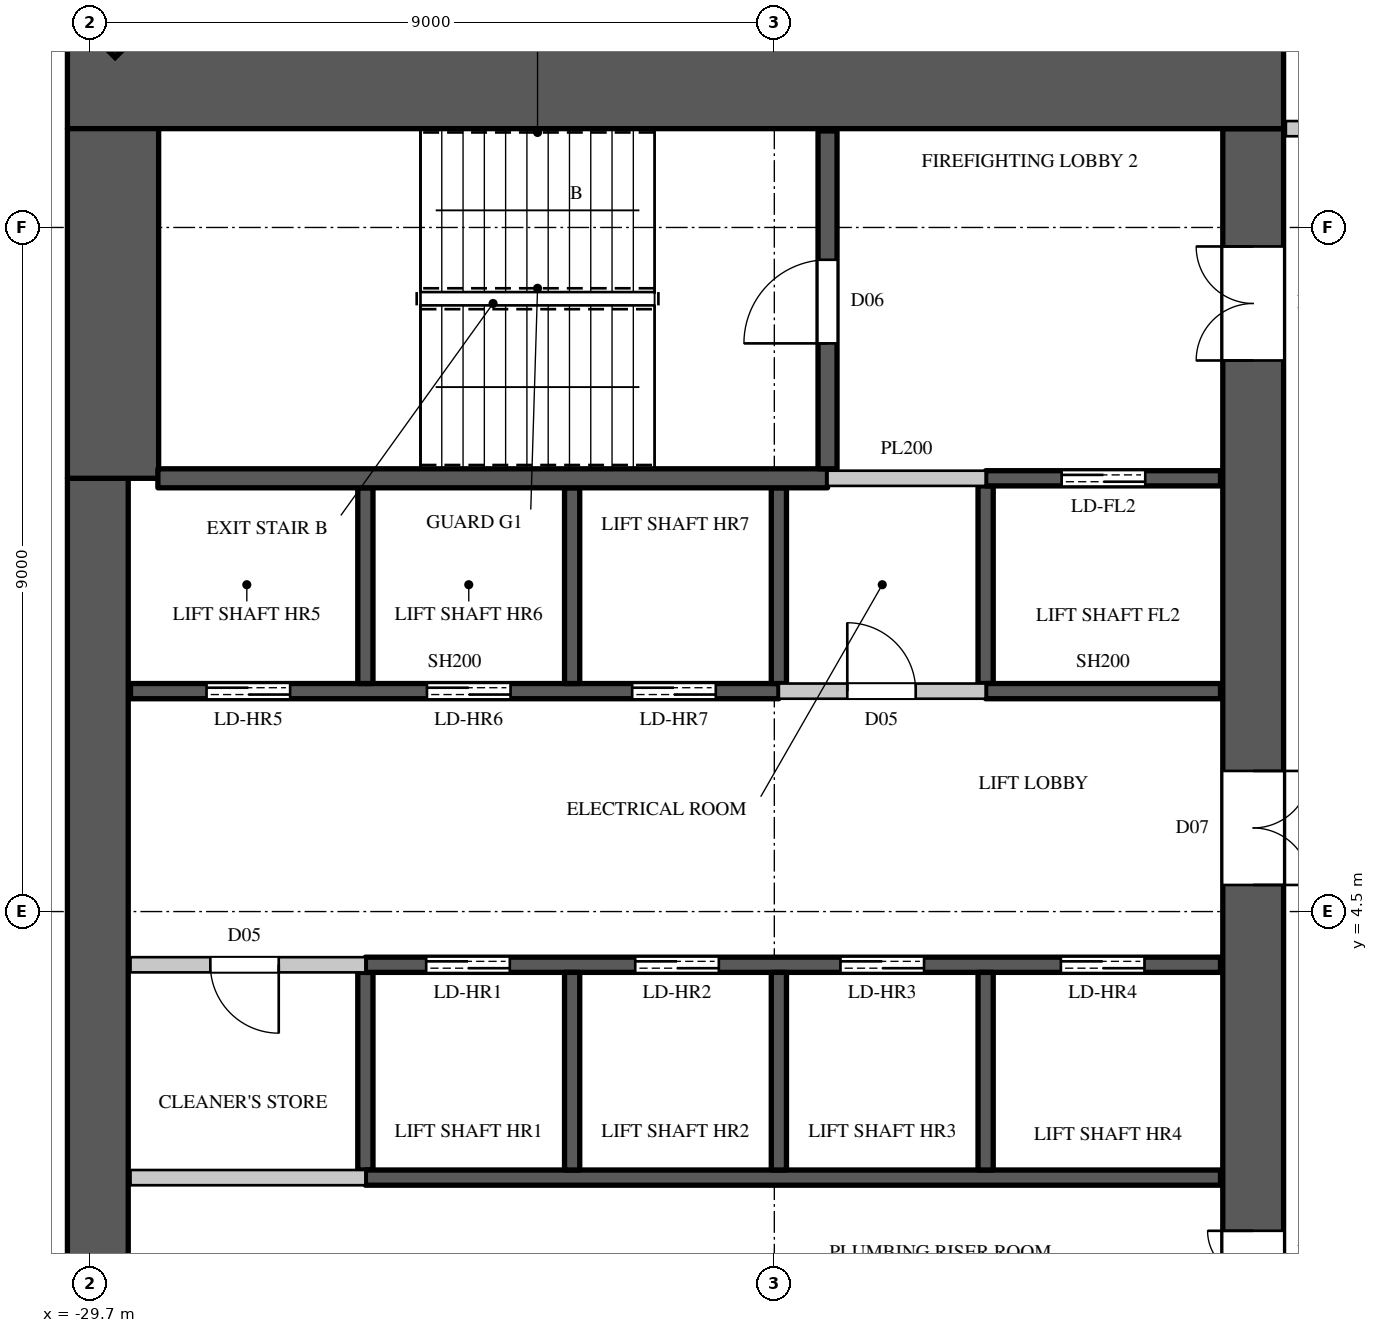
"""IFC4 building model, lengths in metres.
Left out: names, types, materials, properties, quantities, classifications, styles, units other than length and angle.
Written with IfcOpenShell. Run it as: python <this file> out.ifc"""

import sys

from ifc_helpers import new_model, si_unit, direction, frame, frame_2d, origin, origin_2d, place, context, subcontext, project, spatial, rectangle, extrude, element, fill, save


model = new_model("IFC4")
c1 = context("Model", 3, precision=1e-05, world=origin(), true_north=direction((0.0, 1.0)))
c2 = subcontext(c1, "Body", "Model", "MODEL_VIEW")
j1 = project(units=[si_unit("LENGTHUNIT", "METRE"), si_unit("PLANEANGLEUNIT", "RADIAN")], contexts=[c1])
p1 = place(None, origin())
s1 = spatial("IfcSite", under=j1, at=p1, CompositionType="ELEMENT")
p2 = place(p1, origin())
s2 = spatial("IfcBuilding", under=s1, at=p2, CompositionType="ELEMENT")
p3 = place(p2, frame((0.0, 0.0, 222.0)))
s3 = spatial("IfcBuildingStorey", under=s2, at=p3, CompositionType="ELEMENT", Elevation=222.0)
p4 = place(p3, frame((-29.443, 16.443, 0.0), z_axis=(0.0, 0.0, 1.0), x_axis=(-0.707106781187, -0.707106781187, 0.0)))
e1 = element("IfcColumn", 1, at=p4, inside=s3, PredefinedType="COLUMN", context=c2, shape_type="SweptSolid", body=[
    extrude(rectangle(XDim=0.9, YDim=1.1, at=origin_2d()), origin(), (0.0, 0.0, 1.0), 4.1),
])
p5 = place(p3, frame((-30.0, 15.4, 0.0), z_axis=(0.0, 0.0, 1.0), x_axis=(1.0, 0.0, 0.0)))
e2 = element("IfcWall", 2, at=p5, inside=s3, PredefinedType="SHEAR", context=c2, shape_type="SweptSolid", body=[
    extrude(rectangle(XDim=16.0, YDim=1.2, at=frame_2d((8.0, 0.0))), origin(), (0.0, 0.0, 1.0), 4.1),
])
p6 = place(p3, frame((-14.4, -14.8, 0.0), z_axis=(0.0, 0.0, 1.0), x_axis=(0.0, 1.0, 0.0)))
e3 = element("IfcWall", 3, at=p6, inside=s3, PredefinedType="SHEAR", context=c2, shape_type="SweptSolid", body=[
    extrude(rectangle(XDim=29.6, YDim=0.8, at=frame_2d((14.8, 0.0))), origin(), (0.0, 0.0, 1.0), 4.1),
])
p7 = place(p6, frame((1.55, 0.0, 0.0)))
e4 = element("IfcOpeningElement", 4, at=p7, cuts=e3, PredefinedType="OPENING", context=c2, shape_type="SweptSolid", body=[
    extrude(rectangle(XDim=1.5, YDim=2.4, at=frame_2d((0.75, 1.2))), frame((0.0, 0.41, 0.0), z_axis=(0.0, -1.0, 0.0), x_axis=(1.0, 0.0, 0.0)), (0.0, 0.0, 1.0), 0.82),
])
p8 = place(p6, frame((26.55, 0.0, 0.0)))
e5 = element("IfcOpeningElement", 5, at=p8, cuts=e3, PredefinedType="OPENING", context=c2, shape_type="SweptSolid", body=[
    extrude(rectangle(XDim=1.5, YDim=2.4, at=frame_2d((0.75, 1.2))), frame((0.0, 0.41, 0.0), z_axis=(0.0, -1.0, 0.0), x_axis=(1.0, 0.0, 0.0)), (0.0, 0.0, 1.0), 0.82),
])
p9 = place(p6, frame((8.45, 0.0, 0.0)))
e6 = element("IfcOpeningElement", 6, at=p9, cuts=e3, PredefinedType="OPENING", context=c2, shape_type="SweptSolid", body=[
    extrude(rectangle(XDim=1.5, YDim=2.4, at=frame_2d((0.75, 1.2))), frame((0.0, 0.41, 0.0), z_axis=(0.0, -1.0, 0.0), x_axis=(1.0, 0.0, 0.0)), (0.0, 0.0, 1.0), 0.82),
])
p10 = place(p6, frame((19.65, 0.0, 0.0)))
e7 = element("IfcOpeningElement", 7, at=p10, cuts=e3, PredefinedType="OPENING", context=c2, shape_type="SweptSolid", body=[
    extrude(rectangle(XDim=1.5, YDim=2.4, at=frame_2d((0.75, 1.2))), frame((0.0, 0.41, 0.0), z_axis=(0.0, -1.0, 0.0), x_axis=(1.0, 0.0, 0.0)), (0.0, 0.0, 1.0), 0.82),
])
p11 = place(p6, frame((14.5, 0.0, 0.0)))
e8 = element("IfcOpeningElement", 8, at=p11, cuts=e3, PredefinedType="OPENING", context=c2, shape_type="SweptSolid", body=[
    extrude(rectangle(XDim=0.6, YDim=2.0, at=frame_2d((0.3, 1.0))), frame((0.0, 0.41, 0.0), z_axis=(0.0, -1.0, 0.0), x_axis=(1.0, 0.0, 0.0)), (0.0, 0.0, 1.0), 0.82),
])
p12 = place(p3, frame((-29.6, -10.2, 0.0), z_axis=(0.0, 0.0, 1.0), x_axis=(0.0, 1.0, 0.0)))
e9 = element("IfcWall", 9, at=p12, inside=s3, PredefinedType="SHEAR", context=c2, shape_type="SweptSolid", body=[
    extrude(rectangle(XDim=20.4, YDim=0.8, at=frame_2d((10.2, 0.0))), origin(), (0.0, 0.0, 1.0), 4.1),
])
p13 = place(p3, frame((-29.4, 10.2, 0.0), z_axis=(0.0, 0.0, 1.0), x_axis=(0.0, 1.0, 0.0)))
e10 = element("IfcWall", 10, at=p13, inside=s3, PredefinedType="SHEAR", context=c2, shape_type="SweptSolid", body=[
    extrude(rectangle(XDim=4.6, YDim=1.2, at=frame_2d((2.3, 0.0))), origin(), (0.0, 0.0, 1.0), 4.1),
])
p14 = place(p3, frame((-29.17, 3.8, 0.0), z_axis=(0.0, 0.0, 1.0), x_axis=(1.0, 0.0, 0.0)))
e11 = element("IfcWall", 11, at=p14, inside=s3, PredefinedType="PARTITIONING", context=c2, shape_type="SweptSolid", body=[
    extrude(rectangle(XDim=3.09, YDim=0.2, at=frame_2d((1.545, 0.0))), origin(), (0.0, 0.0, 1.0), 3.8),
])
p15 = place(p14, frame((1.05, 0.0, 0.0)))
e12 = element("IfcOpeningElement", 12, at=p15, cuts=e11, PredefinedType="OPENING", context=c2, shape_type="SweptSolid", body=[
    extrude(rectangle(XDim=0.9, YDim=2.2, at=frame_2d((0.45, 1.1))), frame((0.0, 0.11, 0.0), z_axis=(0.0, -1.0, 0.0), x_axis=(1.0, 0.0, 0.0)), (0.0, 0.0, 1.0), 0.22),
])
p16 = place(p3, frame((-13.97, 14.8, 0.0), z_axis=(0.0, 0.0, 1.0), x_axis=(1.0, 0.0, 0.0)))
e13 = element("IfcWall", 13, at=p16, inside=s3, PredefinedType="PARTITIONING", context=c2, shape_type="SweptSolid", body=[
    extrude(rectangle(XDim=2.87, YDim=0.2, at=frame_2d((1.435, 0.0))), origin(), (0.0, 0.0, 1.0), 3.8),
])
p17 = place(p3, frame((-29.17, 1.0, 0.0), z_axis=(0.0, 0.0, 1.0), x_axis=(1.0, 0.0, 0.0)))
e14 = element("IfcWall", 14, at=p17, inside=s3, PredefinedType="PARTITIONING", context=c2, shape_type="SweptSolid", body=[
    extrude(rectangle(XDim=3.09, YDim=0.2, at=frame_2d((1.545, 0.0))), origin(), (0.0, 0.0, 1.0), 3.8),
])
p18 = place(p3, frame((-20.64, 7.4, 0.0), z_axis=(0.0, 0.0, 1.0), x_axis=(1.0, 0.0, 0.0)))
e15 = element("IfcWall", 15, at=p18, inside=s3, PredefinedType="PARTITIONING", context=c2, shape_type="SweptSolid", body=[
    extrude(rectangle(XDim=2.72, YDim=0.2, at=frame_2d((1.36, 0.0))), origin(), (0.0, 0.0, 1.0), 3.8),
])
p19 = place(p18, frame((0.9, 0.0, 0.0)))
e16 = element("IfcOpeningElement", 16, at=p19, cuts=e15, PredefinedType="OPENING", context=c2, shape_type="SweptSolid", body=[
    extrude(rectangle(XDim=0.9, YDim=2.2, at=frame_2d((0.45, 1.1))), frame((0.0, 0.11, 0.0), z_axis=(0.0, -1.0, 0.0), x_axis=(1.0, 0.0, 0.0)), (0.0, 0.0, 1.0), 0.22),
])
p20 = place(p3, frame((-20.0, 10.2, 0.0), z_axis=(0.0, 0.0, 1.0), x_axis=(1.0, 0.0, 0.0)))
e17 = element("IfcWall", 17, at=p20, inside=s3, PredefinedType="PARTITIONING", context=c2, shape_type="SweptSolid", body=[
    extrude(rectangle(XDim=2.08, YDim=0.2, at=frame_2d((1.04, 0.0))), origin(), (0.0, 0.0, 1.0), 3.8),
])
p21 = place(p3, frame((-29.17, 7.4, 0.0), z_axis=(0.0, 0.0, 1.0), x_axis=(1.0, 0.0, 0.0)))
e18 = element("IfcWall", 18, at=p21, inside=s3, PredefinedType="SHEAR", context=c2, shape_type="SweptSolid", body=[
    extrude(rectangle(XDim=8.53, YDim=0.2, at=frame_2d((4.265, 0.0))), origin(), (0.0, 0.0, 1.0), 3.8),
])
p22 = place(p21, frame((1.0, 0.0, 0.0)))
e19 = element("IfcOpeningElement", 19, at=p22, cuts=e18, PredefinedType="OPENING", context=c2, shape_type="SweptSolid", body=[
    extrude(rectangle(XDim=1.1, YDim=2.2, at=frame_2d((0.55, 1.1))), frame((0.0, 0.11, 0.0), z_axis=(0.0, -1.0, 0.0), x_axis=(1.0, 0.0, 0.0)), (0.0, 0.0, 1.0), 0.22),
])
p23 = place(p21, frame((3.9, 0.0, 0.0)))
e20 = element("IfcOpeningElement", 20, at=p23, cuts=e18, PredefinedType="OPENING", context=c2, shape_type="SweptSolid", body=[
    extrude(rectangle(XDim=1.1, YDim=2.2, at=frame_2d((0.55, 1.1))), frame((0.0, 0.11, 0.0), z_axis=(0.0, -1.0, 0.0), x_axis=(1.0, 0.0, 0.0)), (0.0, 0.0, 1.0), 0.22),
])
p24 = place(p21, frame((6.6, 0.0, 0.0)))
e21 = element("IfcOpeningElement", 21, at=p24, cuts=e18, PredefinedType="OPENING", context=c2, shape_type="SweptSolid", body=[
    extrude(rectangle(XDim=1.1, YDim=2.2, at=frame_2d((0.55, 1.1))), frame((0.0, 0.11, 0.0), z_axis=(0.0, -1.0, 0.0), x_axis=(1.0, 0.0, 0.0)), (0.0, 0.0, 1.0), 0.22),
])
p25 = place(p3, frame((-26.08, 1.1, 0.0), z_axis=(0.0, 0.0, 1.0), x_axis=(0.0, 1.0, 0.0)))
e22 = element("IfcWall", 22, at=p25, inside=s3, PredefinedType="SHEAR", context=c2, shape_type="SweptSolid", body=[
    extrude(rectangle(XDim=2.6, YDim=0.2, at=frame_2d((1.3, 0.0))), origin(), (0.0, 0.0, 1.0), 3.8),
])
p26 = place(p3, frame((-26.08, 1.0, 0.0), z_axis=(0.0, 0.0, 1.0), x_axis=(1.0, 0.0, 0.0)))
e23 = element("IfcWall", 23, at=p26, inside=s3, PredefinedType="SHEAR", context=c2, shape_type="SweptSolid", body=[
    extrude(rectangle(XDim=11.25, YDim=0.2, at=frame_2d((5.625, 0.0))), origin(), (0.0, 0.0, 1.0), 3.8),
])
p27 = place(p3, frame((-26.08, 3.8, 0.0), z_axis=(0.0, 0.0, 1.0), x_axis=(1.0, 0.0, 0.0)))
e24 = element("IfcWall", 24, at=p27, inside=s3, PredefinedType="SHEAR", context=c2, shape_type="SweptSolid", body=[
    extrude(rectangle(XDim=11.25, YDim=0.2, at=frame_2d((5.625, 0.0))), origin(), (0.0, 0.0, 1.0), 3.8),
])
p28 = place(p27, frame((0.8, 0.0, 0.0)))
e25 = element("IfcOpeningElement", 25, at=p28, cuts=e24, PredefinedType="OPENING", context=c2, shape_type="SweptSolid", body=[
    extrude(rectangle(XDim=1.1, YDim=2.2, at=frame_2d((0.55, 1.1))), frame((0.0, 0.11, 0.0), z_axis=(0.0, -1.0, 0.0), x_axis=(1.0, 0.0, 0.0)), (0.0, 0.0, 1.0), 0.22),
])
p29 = place(p27, frame((3.55, 0.0, 0.0)))
e26 = element("IfcOpeningElement", 26, at=p29, cuts=e24, PredefinedType="OPENING", context=c2, shape_type="SweptSolid", body=[
    extrude(rectangle(XDim=1.1, YDim=2.2, at=frame_2d((0.55, 1.1))), frame((0.0, 0.11, 0.0), z_axis=(0.0, -1.0, 0.0), x_axis=(1.0, 0.0, 0.0)), (0.0, 0.0, 1.0), 0.22),
])
p30 = place(p27, frame((6.25, 0.0, 0.0)))
e27 = element("IfcOpeningElement", 27, at=p30, cuts=e24, PredefinedType="OPENING", context=c2, shape_type="SweptSolid", body=[
    extrude(rectangle(XDim=1.1, YDim=2.2, at=frame_2d((0.55, 1.1))), frame((0.0, 0.11, 0.0), z_axis=(0.0, -1.0, 0.0), x_axis=(1.0, 0.0, 0.0)), (0.0, 0.0, 1.0), 0.22),
])
p31 = place(p27, frame((9.15, 0.0, 0.0)))
e28 = element("IfcOpeningElement", 28, at=p31, cuts=e24, PredefinedType="OPENING", context=c2, shape_type="SweptSolid", body=[
    extrude(rectangle(XDim=1.1, YDim=2.2, at=frame_2d((0.55, 1.1))), frame((0.0, 0.11, 0.0), z_axis=(0.0, -1.0, 0.0), x_axis=(1.0, 0.0, 0.0)), (0.0, 0.0, 1.0), 0.22),
])
p32 = place(p3, frame((-26.08, 7.5, 0.0), z_axis=(0.0, 0.0, 1.0), x_axis=(0.0, 1.0, 0.0)))
e29 = element("IfcWall", 29, at=p32, inside=s3, PredefinedType="SHEAR", context=c2, shape_type="SweptSolid", body=[
    extrude(rectangle(XDim=2.575, YDim=0.2, at=frame_2d((1.288, 0.0))), origin(), (0.0, 0.0, 1.0), 4.1),
])
p33 = place(p3, frame((-23.36, 1.1, 0.0), z_axis=(0.0, 0.0, 1.0), x_axis=(0.0, 1.0, 0.0)))
e30 = element("IfcWall", 30, at=p33, inside=s3, PredefinedType="SHEAR", context=c2, shape_type="SweptSolid", body=[
    extrude(rectangle(XDim=2.6, YDim=0.2, at=frame_2d((1.3, 0.0))), origin(), (0.0, 0.0, 1.0), 4.1),
])
p34 = place(p3, frame((-23.36, 7.5, 0.0), z_axis=(0.0, 0.0, 1.0), x_axis=(0.0, 1.0, 0.0)))
e31 = element("IfcWall", 31, at=p34, inside=s3, PredefinedType="SHEAR", context=c2, shape_type="SweptSolid", body=[
    extrude(rectangle(XDim=2.575, YDim=0.2, at=frame_2d((1.288, 0.0))), origin(), (0.0, 0.0, 1.0), 4.1),
])
p35 = place(p3, frame((-20.64, 1.1, 0.0), z_axis=(0.0, 0.0, 1.0), x_axis=(0.0, 1.0, 0.0)))
e32 = element("IfcWall", 32, at=p35, inside=s3, PredefinedType="SHEAR", context=c2, shape_type="SweptSolid", body=[
    extrude(rectangle(XDim=2.6, YDim=0.2, at=frame_2d((1.3, 0.0))), origin(), (0.0, 0.0, 1.0), 4.1),
])
p36 = place(p3, frame((-20.64, 7.5, 0.0), z_axis=(0.0, 0.0, 1.0), x_axis=(0.0, 1.0, 0.0)))
e33 = element("IfcWall", 33, at=p36, inside=s3, PredefinedType="SHEAR", context=c2, shape_type="SweptSolid", body=[
    extrude(rectangle(XDim=2.575, YDim=0.2, at=frame_2d((1.288, 0.0))), origin(), (0.0, 0.0, 1.0), 3.8),
])
p37 = place(p3, frame((-17.92, 1.1, 0.0), z_axis=(0.0, 0.0, 1.0), x_axis=(0.0, 1.0, 0.0)))
e34 = element("IfcWall", 34, at=p37, inside=s3, PredefinedType="SHEAR", context=c2, shape_type="SweptSolid", body=[
    extrude(rectangle(XDim=2.6, YDim=0.2, at=frame_2d((1.3, 0.0))), origin(), (0.0, 0.0, 1.0), 4.1),
])
p38 = place(p3, frame((-17.92, 7.5, 0.0), z_axis=(0.0, 0.0, 1.0), x_axis=(0.0, 1.0, 0.0)))
e35 = element("IfcWall", 35, at=p38, inside=s3, PredefinedType="SHEAR", context=c2, shape_type="SweptSolid", body=[
    extrude(rectangle(XDim=2.6, YDim=0.2, at=frame_2d((1.3, 0.0))), origin(), (0.0, 0.0, 1.0), 3.8),
])
p39 = place(p3, frame((-17.92, 7.4, 0.0), z_axis=(0.0, 0.0, 1.0), x_axis=(1.0, 0.0, 0.0)))
e36 = element("IfcWall", 36, at=p39, inside=s3, PredefinedType="SHEAR", context=c2, shape_type="SweptSolid", body=[
    extrude(rectangle(XDim=3.09, YDim=0.2, at=frame_2d((1.545, 0.0))), origin(), (0.0, 0.0, 1.0), 3.8),
])
p40 = place(p3, frame((-17.92, 10.2, 0.0), z_axis=(0.0, 0.0, 1.0), x_axis=(1.0, 0.0, 0.0)))
e37 = element("IfcWall", 37, at=p40, inside=s3, PredefinedType="SHEAR", context=c2, shape_type="SweptSolid", body=[
    extrude(rectangle(XDim=3.09, YDim=0.2, at=frame_2d((1.545, 0.0))), origin(), (0.0, 0.0, 1.0), 3.8),
])
p41 = place(p40, frame((1.0, 0.0, 0.0)))
e38 = element("IfcOpeningElement", 38, at=p41, cuts=e37, PredefinedType="OPENING", context=c2, shape_type="SweptSolid", body=[
    extrude(rectangle(XDim=1.1, YDim=2.2, at=frame_2d((0.55, 1.1))), frame((0.0, 0.11, 0.0), z_axis=(0.0, -1.0, 0.0), x_axis=(1.0, 0.0, 0.0)), (0.0, 0.0, 1.0), 0.22),
])
p42 = place(p3, frame((-28.81, 10.2, 0.0), z_axis=(0.0, 0.0, 1.0), x_axis=(1.0, 0.0, 0.0)))
e39 = element("IfcWall", 39, at=p42, inside=s3, PredefinedType="SHEAR", context=c2, shape_type="SweptSolid", body=[
    extrude(rectangle(XDim=8.81, YDim=0.25, at=frame_2d((4.405, 0.0))), origin(), (0.0, 0.0, 1.0), 3.8),
])
p43 = place(p3, frame((-20.0, 10.325, 0.0), z_axis=(0.0, 0.0, 1.0), x_axis=(0.0, 1.0, 0.0)))
e40 = element("IfcWall", 40, at=p43, inside=s3, PredefinedType="SHEAR", context=c2, shape_type="SweptSolid", body=[
    extrude(rectangle(XDim=4.445, YDim=0.25, at=frame_2d((2.223, 0.0))), origin(), (0.0, 0.0, 1.0), 3.8),
])
p44 = place(p43, frame((1.65, 0.0, 0.0)))
e41 = element("IfcOpeningElement", 41, at=p44, cuts=e40, PredefinedType="OPENING", context=c2, shape_type="SweptSolid", body=[
    extrude(rectangle(XDim=1.1, YDim=2.2, at=frame_2d((0.55, 1.1))), frame((0.0, 0.135, 0.0), z_axis=(0.0, -1.0, 0.0), x_axis=(1.0, 0.0, 0.0)), (0.0, 0.0, 1.0), 0.27),
])
p45 = place(p44, origin())
e42 = element("IfcDoor", 42, at=p45, inside=s3, OperationType="SINGLE_SWING_LEFT", PredefinedType="DOOR", context=c2, shape_type="SweptSolid", body=[
    extrude(rectangle(XDim=1.1, YDim=2.2, at=frame_2d((0.55, 1.1))), frame((0.0, 0.025, 0.0), z_axis=(0.0, -1.0, 0.0), x_axis=(1.0, 0.0, 0.0)), (0.0, 0.0, 1.0), 0.05),
])
fill(e41, e42)
p46 = place(p15, origin())
e43 = element("IfcDoor", 43, at=p46, inside=s3, OperationType="SINGLE_SWING_LEFT", PredefinedType="DOOR", context=c2, shape_type="SweptSolid", body=[
    extrude(rectangle(XDim=0.9, YDim=2.2, at=frame_2d((0.45, 1.1))), frame((0.0, 0.025, 0.0), z_axis=(0.0, -1.0, 0.0), x_axis=(1.0, 0.0, 0.0)), (0.0, 0.0, 1.0), 0.05),
])
fill(e12, e43)
p47 = place(p19, origin())
e44 = element("IfcDoor", 44, at=p47, inside=s3, OperationType="SINGLE_SWING_LEFT", PredefinedType="DOOR", context=c2, shape_type="SweptSolid", body=[
    extrude(rectangle(XDim=0.9, YDim=2.2, at=frame_2d((0.45, 1.1))), frame((0.0, 0.025, 0.0), z_axis=(0.0, -1.0, 0.0), x_axis=(1.0, 0.0, 0.0)), (0.0, 0.0, 1.0), 0.05),
])
fill(e16, e44)
p48 = place(p28, origin())
e45 = element("IfcDoor", 45, at=p48, inside=s3, OperationType="DOUBLE_DOOR_SLIDING", PredefinedType="DOOR", context=c2, shape_type="SweptSolid", body=[
    extrude(rectangle(XDim=1.1, YDim=2.2, at=frame_2d((0.55, 1.1))), frame((0.0, 0.025, 0.0), z_axis=(0.0, -1.0, 0.0), x_axis=(1.0, 0.0, 0.0)), (0.0, 0.0, 1.0), 0.05),
])
fill(e25, e45)
p49 = place(p29, origin())
e46 = element("IfcDoor", 46, at=p49, inside=s3, OperationType="DOUBLE_DOOR_SLIDING", PredefinedType="DOOR", context=c2, shape_type="SweptSolid", body=[
    extrude(rectangle(XDim=1.1, YDim=2.2, at=frame_2d((0.55, 1.1))), frame((0.0, 0.025, 0.0), z_axis=(0.0, -1.0, 0.0), x_axis=(1.0, 0.0, 0.0)), (0.0, 0.0, 1.0), 0.05),
])
fill(e26, e46)
p50 = place(p30, origin())
e47 = element("IfcDoor", 47, at=p50, inside=s3, OperationType="DOUBLE_DOOR_SLIDING", PredefinedType="DOOR", context=c2, shape_type="SweptSolid", body=[
    extrude(rectangle(XDim=1.1, YDim=2.2, at=frame_2d((0.55, 1.1))), frame((0.0, 0.025, 0.0), z_axis=(0.0, -1.0, 0.0), x_axis=(1.0, 0.0, 0.0)), (0.0, 0.0, 1.0), 0.05),
])
fill(e27, e47)
p51 = place(p31, origin())
e48 = element("IfcDoor", 48, at=p51, inside=s3, OperationType="DOUBLE_DOOR_SLIDING", PredefinedType="DOOR", context=c2, shape_type="SweptSolid", body=[
    extrude(rectangle(XDim=1.1, YDim=2.2, at=frame_2d((0.55, 1.1))), frame((0.0, 0.025, 0.0), z_axis=(0.0, -1.0, 0.0), x_axis=(1.0, 0.0, 0.0)), (0.0, 0.0, 1.0), 0.05),
])
fill(e28, e48)
p52 = place(p22, origin())
e49 = element("IfcDoor", 49, at=p52, inside=s3, OperationType="DOUBLE_DOOR_SLIDING", PredefinedType="DOOR", context=c2, shape_type="SweptSolid", body=[
    extrude(rectangle(XDim=1.1, YDim=2.2, at=frame_2d((0.55, 1.1))), frame((0.0, 0.025, 0.0), z_axis=(0.0, -1.0, 0.0), x_axis=(1.0, 0.0, 0.0)), (0.0, 0.0, 1.0), 0.05),
])
fill(e19, e49)
p53 = place(p23, origin())
e50 = element("IfcDoor", 50, at=p53, inside=s3, OperationType="DOUBLE_DOOR_SLIDING", PredefinedType="DOOR", context=c2, shape_type="SweptSolid", body=[
    extrude(rectangle(XDim=1.1, YDim=2.2, at=frame_2d((0.55, 1.1))), frame((0.0, 0.025, 0.0), z_axis=(0.0, -1.0, 0.0), x_axis=(1.0, 0.0, 0.0)), (0.0, 0.0, 1.0), 0.05),
])
fill(e20, e50)
p54 = place(p24, origin())
e51 = element("IfcDoor", 51, at=p54, inside=s3, OperationType="DOUBLE_DOOR_SLIDING", PredefinedType="DOOR", context=c2, shape_type="SweptSolid", body=[
    extrude(rectangle(XDim=1.1, YDim=2.2, at=frame_2d((0.55, 1.1))), frame((0.0, 0.025, 0.0), z_axis=(0.0, -1.0, 0.0), x_axis=(1.0, 0.0, 0.0)), (0.0, 0.0, 1.0), 0.05),
])
fill(e21, e51)
p55 = place(p41, origin())
e52 = element("IfcDoor", 52, at=p55, inside=s3, OperationType="DOUBLE_DOOR_SLIDING", PredefinedType="DOOR", context=c2, shape_type="SweptSolid", body=[
    extrude(rectangle(XDim=1.1, YDim=2.2, at=frame_2d((0.55, 1.1))), frame((0.0, 0.025, 0.0), z_axis=(0.0, -1.0, 0.0), x_axis=(1.0, 0.0, 0.0)), (0.0, 0.0, 1.0), 0.05),
])
fill(e38, e52)
p56 = place(p8, origin())
e53 = element("IfcDoor", 53, at=p56, inside=s3, OperationType="DOUBLE_DOOR_SINGLE_SWING", PredefinedType="DOOR", context=c2, shape_type="SweptSolid", body=[
    extrude(rectangle(XDim=1.5, YDim=2.4, at=frame_2d((0.75, 1.2))), frame((0.0, 0.395, 0.0), z_axis=(0.0, -1.0, 0.0), x_axis=(1.0, 0.0, 0.0)), (0.0, 0.0, 1.0), 0.05),
])
fill(e5, e53)
p57 = place(p10, origin())
e54 = element("IfcDoor", 54, at=p57, inside=s3, OperationType="DOUBLE_DOOR_SINGLE_SWING", PredefinedType="DOOR", context=c2, shape_type="SweptSolid", body=[
    extrude(rectangle(XDim=1.5, YDim=2.4, at=frame_2d((0.75, 1.2))), frame((0.0, -0.345, 0.0), z_axis=(0.0, -1.0, 0.0), x_axis=(1.0, 0.0, 0.0)), (0.0, 0.0, 1.0), 0.05),
])
fill(e7, e54)
p58 = place(p11, origin())
e55 = element("IfcDoor", 55, at=p58, inside=s3, OperationType="SINGLE_SWING_RIGHT", PredefinedType="DOOR", context=c2, shape_type="SweptSolid", body=[
    extrude(rectangle(XDim=0.6, YDim=2.0, at=frame_2d((0.3, 1.0))), frame((0.0, 0.395, 0.0), z_axis=(0.0, -1.0, 0.0), x_axis=(1.0, 0.0, 0.0)), (0.0, 0.0, 1.0), 0.05),
])
fill(e8, e55)
save(model, sys.argv[1])
